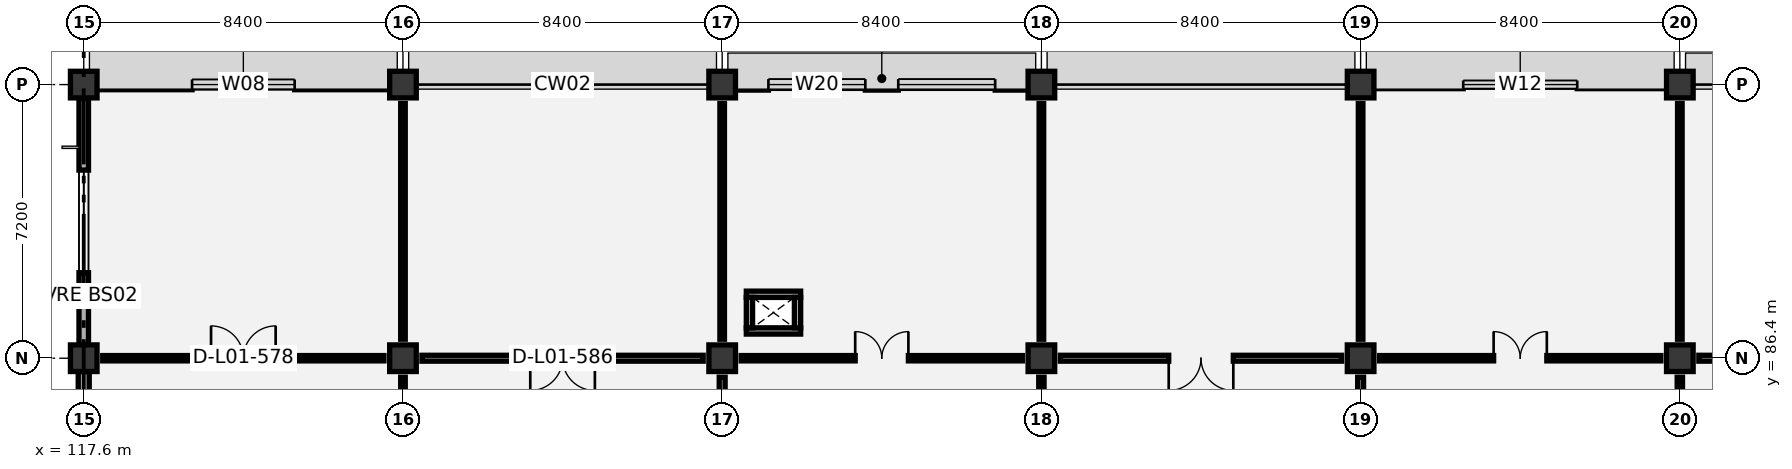
"""IFC4 building model, lengths in metres.
Left out: names, types, materials, properties, quantities, classifications, styles, units other than length and angle.
Written with IfcOpenShell. Run it as: python <this file> out.ifc"""

import sys

from ifc_helpers import new_model, si_unit, direction, frame, frame_2d, origin, origin_2d, place, context, subcontext, project, spatial, rectangle, extrude, element, fill, save


model = new_model("IFC4")
c1 = context("Model", 3, precision=1e-05, world=origin(), true_north=direction((0.0, 1.0)))
c2 = subcontext(c1, "Body", "Model", "MODEL_VIEW")
j1 = project(units=[si_unit("LENGTHUNIT", "METRE"), si_unit("PLANEANGLEUNIT", "RADIAN")], contexts=[c1])
p1 = place(None, origin())
s1 = spatial("IfcSite", under=j1, at=p1, CompositionType="ELEMENT")
p2 = place(p1, origin())
s2 = spatial("IfcBuilding", under=s1, at=p2, CompositionType="ELEMENT")
p3 = place(p2, frame((0.0, 0.0, 6.0)))
s3 = spatial("IfcBuildingStorey", under=s2, at=p3, CompositionType="ELEMENT", Elevation=6.0)
for number, where, z_axis, x_axis in (
    (1, (117.6, 86.4, 0.0), (0.0, 0.0, 1.0), (1.0, 0.0, 0.0)),
    (2, (117.6, 93.6, 0.0), (0.0, 0.0, 1.0), (1.0, 0.0, 0.0)),
    (3, (126.0, 86.4, 0.0), (0.0, 0.0, 1.0), (1.0, 0.0, 0.0)),
    (4, (126.0, 93.6, 0.0), (0.0, 0.0, 1.0), (1.0, 0.0, 0.0)),
    (5, (134.4, 86.4, 0.0), (0.0, 0.0, 1.0), (1.0, 0.0, 0.0)),
    (6, (134.4, 93.6, 0.0), (0.0, 0.0, 1.0), (1.0, 0.0, 0.0)),
    (7, (142.8, 86.4, 0.0), (0.0, 0.0, 1.0), (1.0, 0.0, 0.0)),
    (8, (142.8, 93.6, 0.0), (0.0, 0.0, 1.0), (1.0, 0.0, 0.0)),
    (9, (151.2, 86.4, 0.0), (0.0, 0.0, 1.0), (1.0, 0.0, 0.0)),
    (10, (151.2, 93.6, 0.0), (0.0, 0.0, 1.0), (1.0, 0.0, 0.0)),
    (11, (159.6, 86.4, 0.0), (0.0, 0.0, 1.0), (1.0, 0.0, 0.0)),
    (12, (159.6, 93.6, 0.0), (0.0, 0.0, 1.0), (1.0, 0.0, 0.0)),
):
    element("IfcColumn", number, at=place(p3, frame(where, z_axis=z_axis, x_axis=x_axis)), inside=s3, PredefinedType="COLUMN", context=c2, shape_type="SweptSolid", body=[
        extrude(rectangle(XDim=0.7, YDim=0.7, at=origin_2d()), origin(), (0.0, 0.0, 1.0), 5.4),
    ])
p4 = place(p3, frame((117.6, 79.55, 0.0), z_axis=(0.0, 0.0, 1.0), x_axis=(0.0, 1.0, 0.0)))
e13 = element("IfcWall", 13, at=p4, inside=s3, PredefinedType="SOLIDWALL", context=c2, shape_type="SweptSolid", body=[
    extrude(rectangle(XDim=6.5, YDim=0.29, at=frame_2d((3.25, 0.0))), origin(), (0.0, 0.0, 1.0), 4.42),
])
p5 = place(p4, frame((1.45, 0.0, 0.9)))
e14 = element("IfcOpeningElement", 14, at=p5, cuts=e13, PredefinedType="OPENING", context=c2, shape_type="SweptSolid", body=[
    extrude(rectangle(XDim=3.6, YDim=2.4, at=frame_2d((1.8, 1.2))), frame((0.0, 0.155, 0.0), z_axis=(0.0, -1.0, 0.0), x_axis=(1.0, 0.0, 0.0)), (0.0, 0.0, 1.0), 0.31),
])
p6 = place(p3, frame((117.95, 93.6, 0.0), z_axis=(0.0, 0.0, 1.0), x_axis=(1.0, 0.0, 0.0)))
e15 = element("IfcWall", 15, at=p6, inside=s3, PredefinedType="SOLIDWALL", context=c2, shape_type="SweptSolid", body=[
    extrude(rectangle(XDim=7.7, YDim=0.27, at=frame_2d((3.85, 0.0))), origin(), (0.0, 0.0, 1.0), 4.52),
])
p7 = place(p6, frame((2.5, 0.0, 0.9)))
e16 = element("IfcOpeningElement", 16, at=p7, cuts=e15, PredefinedType="OPENING", context=c2, shape_type="SweptSolid", body=[
    extrude(rectangle(XDim=2.7, YDim=2.1, at=frame_2d((1.35, 1.05))), frame((0.0, 0.145, 0.0), z_axis=(0.0, -1.0, 0.0), x_axis=(1.0, 0.0, 0.0)), (0.0, 0.0, 1.0), 0.29),
])
p8 = place(p3, frame((117.6, 86.75, 0.0), z_axis=(0.0, 0.0, 1.0), x_axis=(0.0, 1.0, 0.0)))
e17 = element("IfcWall", 17, at=p8, inside=s3, PredefinedType="SOLIDWALL", context=c2, shape_type="SweptSolid", body=[
    extrude(rectangle(XDim=6.5, YDim=0.25, at=frame_2d((3.25, 0.0))), origin(), (0.0, 0.0, 1.0), 4.52),
])
p9 = place(p8, frame((1.9, 0.0, 0.9)))
e18 = element("IfcOpeningElement", 18, at=p9, cuts=e17, PredefinedType="OPENING", context=c2, shape_type="SweptSolid", body=[
    extrude(rectangle(XDim=2.7, YDim=2.1, at=frame_2d((1.35, 1.05))), frame((0.0, 0.135, 0.0), z_axis=(0.0, -1.0, 0.0), x_axis=(1.0, 0.0, 0.0)), (0.0, 0.0, 1.0), 0.27),
])
p10 = place(p3, frame((134.75, 93.6, 0.0), z_axis=(0.0, 0.0, 1.0), x_axis=(1.0, 0.0, 0.0)))
e19 = element("IfcWall", 19, at=p10, inside=s3, PredefinedType="SOLIDWALL", context=c2, shape_type="SweptSolid", body=[
    extrude(rectangle(XDim=7.7, YDim=0.29, at=frame_2d((3.85, 0.0))), origin(), (0.0, 0.0, 1.0), 4.52),
])
p11 = place(p10, frame((0.867, 0.0, 0.9)))
e20 = element("IfcOpeningElement", 20, at=p11, cuts=e19, PredefinedType="OPENING", context=c2, shape_type="SweptSolid", body=[
    extrude(rectangle(XDim=2.55, YDim=1.95, at=frame_2d((1.275, 0.975))), frame((0.0, 0.155, 0.0), z_axis=(0.0, -1.0, 0.0), x_axis=(1.0, 0.0, 0.0)), (0.0, 0.0, 1.0), 0.31),
])
p12 = place(p10, frame((4.283, 0.0, 0.9)))
e21 = element("IfcOpeningElement", 21, at=p12, cuts=e19, PredefinedType="OPENING", context=c2, shape_type="SweptSolid", body=[
    extrude(rectangle(XDim=2.55, YDim=1.95, at=frame_2d((1.275, 0.975))), frame((0.0, 0.155, 0.0), z_axis=(0.0, -1.0, 0.0), x_axis=(1.0, 0.0, 0.0)), (0.0, 0.0, 1.0), 0.31),
])
p13 = place(p3, frame((151.55, 93.6, 0.0), z_axis=(0.0, 0.0, 1.0), x_axis=(1.0, 0.0, 0.0)))
e22 = element("IfcWall", 22, at=p13, inside=s3, PredefinedType="SOLIDWALL", context=c2, shape_type="SweptSolid", body=[
    extrude(rectangle(XDim=7.7, YDim=0.215, at=frame_2d((3.85, 0.0))), origin(), (0.0, 0.0, 1.0), 4.52),
])
p14 = place(p13, frame((2.35, 0.0, 0.9)))
e23 = element("IfcOpeningElement", 23, at=p14, cuts=e22, PredefinedType="OPENING", context=c2, shape_type="SweptSolid", body=[
    extrude(rectangle(XDim=3.0, YDim=2.4, at=frame_2d((1.5, 1.2))), frame((0.0, 0.117, 0.0), z_axis=(0.0, -1.0, 0.0), x_axis=(1.0, 0.0, 0.0)), (0.0, 0.0, 1.0), 0.235),
])
p15 = place(p3, frame((117.6, 93.72, 0.0), z_axis=(0.0, 0.0, 1.0), x_axis=(0.0, 1.0, 0.0)))
e24 = element("IfcWall", 24, at=p15, inside=s3, PredefinedType="PARAPET", context=c2, shape_type="SweptSolid", body=[
    extrude(rectangle(XDim=6.96, YDim=0.22, at=frame_2d((3.48, 0.0))), origin(), (0.0, 0.0, 1.0), 1.15),
])
for number, where, z_axis, x_axis in (
    (25, (135.035, 87.117, 0.0), (0.0, 0.0, 1.0), (1.0, 0.0, 0.0)),
    (26, (135.035, 88.083, 0.0), (0.0, 0.0, 1.0), (1.0, 0.0, 0.0)),
):
    element("IfcWall", number, at=place(p3, frame(where, z_axis=z_axis, x_axis=x_axis)), inside=s3, PredefinedType="PARTITIONING", context=c2, shape_type="SweptSolid", body=[
        extrude(rectangle(XDim=1.43, YDim=0.165, at=frame_2d((0.715, 0.0))), origin(), (0.0, 0.0, 1.0), 5.075),
    ])
for number, where, z_axis, x_axis in (
    (27, (135.117, 87.2, 0.0), (0.0, 0.0, 1.0), (0.0, 1.0, 0.0)),
    (28, (136.383, 87.2, 0.0), (0.0, 0.0, 1.0), (0.0, 1.0, 0.0)),
):
    element("IfcWall", number, at=place(p3, frame(where, z_axis=z_axis, x_axis=x_axis)), inside=s3, PredefinedType="PARTITIONING", context=c2, shape_type="SweptSolid", body=[
        extrude(rectangle(XDim=0.8, YDim=0.165, at=frame_2d((0.4, 0.0))), origin(), (0.0, 0.0, 1.0), 5.075),
    ])
p16 = place(p3, frame((126.0, 79.7, 0.0), z_axis=(0.0, 0.0, 1.0), x_axis=(0.0, 1.0, 0.0)))
e29 = element("IfcWall", 29, at=p16, inside=s3, PredefinedType="PARTITIONING", context=c2, shape_type="SweptSolid", body=[
    extrude(rectangle(XDim=6.2, YDim=0.12, at=frame_2d((3.1, 0.0))), origin(), (0.0, 0.0, 1.0), 4.32),
])
p17 = place(p3, frame((118.1, 86.4, 0.0), z_axis=(0.0, 0.0, 1.0), x_axis=(1.0, 0.0, 0.0)))
e30 = element("IfcWall", 30, at=p17, inside=s3, PredefinedType="PARTITIONING", context=c2, shape_type="SweptSolid", body=[
    extrude(rectangle(XDim=7.4, YDim=0.14, at=frame_2d((3.7, 0.0))), origin(), (0.0, 0.0, 1.0), 4.27),
])
p18 = place(p17, frame((2.85, 0.0, 0.0)))
e31 = element("IfcOpeningElement", 31, at=p18, cuts=e30, PredefinedType="OPENING", context=c2, shape_type="SweptSolid", body=[
    extrude(rectangle(XDim=1.7, YDim=2.25, at=frame_2d((0.85, 1.125))), frame((0.0, 0.08, 0.0), z_axis=(0.0, -1.0, 0.0), x_axis=(1.0, 0.0, 0.0)), (0.0, 0.0, 1.0), 0.16),
])
p19 = place(p3, frame((126.0, 86.9, 0.0), z_axis=(0.0, 0.0, 1.0), x_axis=(0.0, 1.0, 0.0)))
e32 = element("IfcWall", 32, at=p19, inside=s3, PredefinedType="PARTITIONING", context=c2, shape_type="SweptSolid", body=[
    extrude(rectangle(XDim=6.2, YDim=0.12, at=frame_2d((3.1, 0.0))), origin(), (0.0, 0.0, 1.0), 4.67),
])
p20 = place(p3, frame((134.4, 79.7, 0.0), z_axis=(0.0, 0.0, 1.0), x_axis=(0.0, 1.0, 0.0)))
e33 = element("IfcWall", 33, at=p20, inside=s3, PredefinedType="PARTITIONING", context=c2, shape_type="SweptSolid", body=[
    extrude(rectangle(XDim=6.2, YDim=0.155, at=frame_2d((3.1, 0.0))), origin(), (0.0, 0.0, 1.0), 4.57),
])
p21 = place(p20, frame((2.4, 0.0, 0.0)))
e34 = element("IfcOpeningElement", 34, at=p21, cuts=e33, PredefinedType="OPENING", context=c2, shape_type="SweptSolid", body=[
    extrude(rectangle(XDim=1.4, YDim=2.15, at=frame_2d((0.7, 1.075))), frame((0.0, 0.087, 0.0), z_axis=(0.0, -1.0, 0.0), x_axis=(1.0, 0.0, 0.0)), (0.0, 0.0, 1.0), 0.175),
])
p22 = place(p3, frame((126.5, 86.4, 0.0), z_axis=(0.0, 0.0, 1.0), x_axis=(1.0, 0.0, 0.0)))
e35 = element("IfcWall", 35, at=p22, inside=s3, PredefinedType="PARTITIONING", context=c2, shape_type="SweptSolid", body=[
    extrude(rectangle(XDim=7.4, YDim=0.155, at=frame_2d((3.7, 0.0))), origin(), (0.0, 0.0, 1.0), 4.27),
])
p23 = place(p22, frame((2.85, 0.0, 0.0)))
e36 = element("IfcOpeningElement", 36, at=p23, cuts=e35, PredefinedType="OPENING", context=c2, shape_type="SweptSolid", body=[
    extrude(rectangle(XDim=1.7, YDim=2.25, at=frame_2d((0.85, 1.125))), frame((0.0, 0.087, 0.0), z_axis=(0.0, -1.0, 0.0), x_axis=(1.0, 0.0, 0.0)), (0.0, 0.0, 1.0), 0.175),
])
p24 = place(p3, frame((134.4, 86.9, 0.0), z_axis=(0.0, 0.0, 1.0), x_axis=(0.0, 1.0, 0.0)))
e37 = element("IfcWall", 37, at=p24, inside=s3, PredefinedType="PARTITIONING", context=c2, shape_type="SweptSolid", body=[
    extrude(rectangle(XDim=6.2, YDim=0.12, at=frame_2d((3.1, 0.0))), origin(), (0.0, 0.0, 1.0), 4.42),
])
p25 = place(p3, frame((142.8, 79.7, 0.0), z_axis=(0.0, 0.0, 1.0), x_axis=(0.0, 1.0, 0.0)))
e38 = element("IfcWall", 38, at=p25, inside=s3, PredefinedType="PARTITIONING", context=c2, shape_type="SweptSolid", body=[
    extrude(rectangle(XDim=6.2, YDim=0.14, at=frame_2d((3.1, 0.0))), origin(), (0.0, 0.0, 1.0), 4.32),
])
p26 = place(p25, frame((2.25, 0.0, 0.0)))
e39 = element("IfcOpeningElement", 39, at=p26, cuts=e38, PredefinedType="OPENING", context=c2, shape_type="SweptSolid", body=[
    extrude(rectangle(XDim=1.7, YDim=2.25, at=frame_2d((0.85, 1.125))), frame((0.0, 0.08, 0.0), z_axis=(0.0, -1.0, 0.0), x_axis=(1.0, 0.0, 0.0)), (0.0, 0.0, 1.0), 0.16),
])
p27 = place(p3, frame((134.9, 86.4, 0.0), z_axis=(0.0, 0.0, 1.0), x_axis=(1.0, 0.0, 0.0)))
e40 = element("IfcWall", 40, at=p27, inside=s3, PredefinedType="PARTITIONING", context=c2, shape_type="SweptSolid", body=[
    extrude(rectangle(XDim=7.4, YDim=0.14, at=frame_2d((3.7, 0.0))), origin(), (0.0, 0.0, 1.0), 4.27),
])
p28 = place(p27, frame((3.0, 0.0, 0.0)))
e41 = element("IfcOpeningElement", 41, at=p28, cuts=e40, PredefinedType="OPENING", context=c2, shape_type="SweptSolid", body=[
    extrude(rectangle(XDim=1.4, YDim=2.15, at=frame_2d((0.7, 1.075))), frame((0.0, 0.08, 0.0), z_axis=(0.0, -1.0, 0.0), x_axis=(1.0, 0.0, 0.0)), (0.0, 0.0, 1.0), 0.16),
])
p29 = place(p3, frame((142.8, 86.9, 0.0), z_axis=(0.0, 0.0, 1.0), x_axis=(0.0, 1.0, 0.0)))
e42 = element("IfcWall", 42, at=p29, inside=s3, PredefinedType="PARTITIONING", context=c2, shape_type="SweptSolid", body=[
    extrude(rectangle(XDim=6.2, YDim=0.12, at=frame_2d((3.1, 0.0))), origin(), (0.0, 0.0, 1.0), 4.77),
])
p30 = place(p3, frame((151.2, 79.7, 0.0), z_axis=(0.0, 0.0, 1.0), x_axis=(0.0, 1.0, 0.0)))
e43 = element("IfcWall", 43, at=p30, inside=s3, PredefinedType="PARTITIONING", context=c2, shape_type="SweptSolid", body=[
    extrude(rectangle(XDim=6.2, YDim=0.155, at=frame_2d((3.1, 0.0))), origin(), (0.0, 0.0, 1.0), 4.67),
])
p31 = place(p30, frame((2.4, 0.0, 0.0)))
e44 = element("IfcOpeningElement", 44, at=p31, cuts=e43, PredefinedType="OPENING", context=c2, shape_type="SweptSolid", body=[
    extrude(rectangle(XDim=1.4, YDim=2.15, at=frame_2d((0.7, 1.075))), frame((0.0, 0.087, 0.0), z_axis=(0.0, -1.0, 0.0), x_axis=(1.0, 0.0, 0.0)), (0.0, 0.0, 1.0), 0.175),
])
p32 = place(p3, frame((143.3, 86.4, 0.0), z_axis=(0.0, 0.0, 1.0), x_axis=(1.0, 0.0, 0.0)))
e45 = element("IfcWall", 45, at=p32, inside=s3, PredefinedType="PARTITIONING", context=c2, shape_type="SweptSolid", body=[
    extrude(rectangle(XDim=7.4, YDim=0.155, at=frame_2d((3.7, 0.0))), origin(), (0.0, 0.0, 1.0), 4.27),
])
p33 = place(p32, frame((2.85, 0.0, 0.0)))
e46 = element("IfcOpeningElement", 46, at=p33, cuts=e45, PredefinedType="OPENING", context=c2, shape_type="SweptSolid", body=[
    extrude(rectangle(XDim=1.7, YDim=2.25, at=frame_2d((0.85, 1.125))), frame((0.0, 0.087, 0.0), z_axis=(0.0, -1.0, 0.0), x_axis=(1.0, 0.0, 0.0)), (0.0, 0.0, 1.0), 0.175),
])
p34 = place(p3, frame((151.2, 86.9, 0.0), z_axis=(0.0, 0.0, 1.0), x_axis=(0.0, 1.0, 0.0)))
e47 = element("IfcWall", 47, at=p34, inside=s3, PredefinedType="PARTITIONING", context=c2, shape_type="SweptSolid", body=[
    extrude(rectangle(XDim=6.2, YDim=0.12, at=frame_2d((3.1, 0.0))), origin(), (0.0, 0.0, 1.0), 4.42),
])
p35 = place(p3, frame((159.6, 79.7, 0.0), z_axis=(0.0, 0.0, 1.0), x_axis=(0.0, 1.0, 0.0)))
e48 = element("IfcWall", 48, at=p35, inside=s3, PredefinedType="PARTITIONING", context=c2, shape_type="SweptSolid", body=[
    extrude(rectangle(XDim=6.2, YDim=0.14, at=frame_2d((3.1, 0.0))), origin(), (0.0, 0.0, 1.0), 4.32),
])
p36 = place(p35, frame((2.25, 0.0, 0.0)))
e49 = element("IfcOpeningElement", 49, at=p36, cuts=e48, PredefinedType="OPENING", context=c2, shape_type="SweptSolid", body=[
    extrude(rectangle(XDim=1.7, YDim=2.25, at=frame_2d((0.85, 1.125))), frame((0.0, 0.08, 0.0), z_axis=(0.0, -1.0, 0.0), x_axis=(1.0, 0.0, 0.0)), (0.0, 0.0, 1.0), 0.16),
])
p37 = place(p3, frame((151.7, 86.4, 0.0), z_axis=(0.0, 0.0, 1.0), x_axis=(1.0, 0.0, 0.0)))
e50 = element("IfcWall", 50, at=p37, inside=s3, PredefinedType="PARTITIONING", context=c2, shape_type="SweptSolid", body=[
    extrude(rectangle(XDim=7.4, YDim=0.14, at=frame_2d((3.7, 0.0))), origin(), (0.0, 0.0, 1.0), 4.27),
])
p38 = place(p37, frame((3.0, 0.0, 0.0)))
e51 = element("IfcOpeningElement", 51, at=p38, cuts=e50, PredefinedType="OPENING", context=c2, shape_type="SweptSolid", body=[
    extrude(rectangle(XDim=1.4, YDim=2.15, at=frame_2d((0.7, 1.075))), frame((0.0, 0.08, 0.0), z_axis=(0.0, -1.0, 0.0), x_axis=(1.0, 0.0, 0.0)), (0.0, 0.0, 1.0), 0.16),
])
p39 = place(p3, frame((159.6, 86.9, 0.0), z_axis=(0.0, 0.0, 1.0), x_axis=(0.0, 1.0, 0.0)))
e52 = element("IfcWall", 52, at=p39, inside=s3, PredefinedType="PARTITIONING", context=c2, shape_type="SweptSolid", body=[
    extrude(rectangle(XDim=6.2, YDim=0.12, at=frame_2d((3.1, 0.0))), origin(), (0.0, 0.0, 1.0), 4.88),
])
p40 = place(p3, frame((160.1, 86.4, 0.0), z_axis=(0.0, 0.0, 1.0), x_axis=(1.0, 0.0, 0.0)))
e53 = element("IfcWall", 53, at=p40, inside=s3, PredefinedType="PARTITIONING", context=c2, shape_type="SweptSolid", body=[
    extrude(rectangle(XDim=7.4, YDim=0.155, at=frame_2d((3.7, 0.0))), origin(), (0.0, 0.0, 1.0), 4.37),
])
p41 = place(p40, frame((3.0, 0.0, 0.0)))
e54 = element("IfcOpeningElement", 54, at=p41, cuts=e53, PredefinedType="OPENING", context=c2, shape_type="SweptSolid", body=[
    extrude(rectangle(XDim=1.4, YDim=2.15, at=frame_2d((0.7, 1.075))), frame((0.0, 0.087, 0.0), z_axis=(0.0, -1.0, 0.0), x_axis=(1.0, 0.0, 0.0)), (0.0, 0.0, 1.0), 0.175),
])
p42 = place(p7, origin())
e55 = element("IfcWindow", 55, at=p42, inside=s3, PartitioningType="SINGLE_PANEL", PredefinedType="WINDOW", context=c2, shape_type="SweptSolid", body=[
    extrude(rectangle(XDim=2.7, YDim=2.1, at=frame_2d((1.35, 1.05))), frame((0.0, 0.03, 0.0), z_axis=(0.0, -1.0, 0.0), x_axis=(1.0, 0.0, 0.0)), (0.0, 0.0, 1.0), 0.06),
])
fill(e16, e55)
p43 = place(p9, origin())
e56 = element("IfcWindow", 56, at=p43, inside=s3, PartitioningType="SINGLE_PANEL", PredefinedType="WINDOW", context=c2, shape_type="SweptSolid", body=[
    extrude(rectangle(XDim=2.7, YDim=2.1, at=frame_2d((1.35, 1.05))), frame((0.0, 0.03, 0.0), z_axis=(0.0, -1.0, 0.0), x_axis=(1.0, 0.0, 0.0)), (0.0, 0.0, 1.0), 0.06),
])
fill(e18, e56)
p44 = place(p11, origin())
e57 = element("IfcWindow", 57, at=p44, inside=s3, PartitioningType="SINGLE_PANEL", PredefinedType="WINDOW", context=c2, shape_type="SweptSolid", body=[
    extrude(rectangle(XDim=2.55, YDim=1.95, at=frame_2d((1.275, 0.975))), frame((0.0, 0.03, 0.0), z_axis=(0.0, -1.0, 0.0), x_axis=(1.0, 0.0, 0.0)), (0.0, 0.0, 1.0), 0.06),
])
fill(e20, e57)
p45 = place(p12, origin())
e58 = element("IfcWindow", 58, at=p45, inside=s3, PartitioningType="SINGLE_PANEL", PredefinedType="WINDOW", context=c2, shape_type="SweptSolid", body=[
    extrude(rectangle(XDim=2.55, YDim=1.95, at=frame_2d((1.275, 0.975))), frame((0.0, 0.03, 0.0), z_axis=(0.0, -1.0, 0.0), x_axis=(1.0, 0.0, 0.0)), (0.0, 0.0, 1.0), 0.06),
])
fill(e21, e58)
p46 = place(p14, origin())
e59 = element("IfcWindow", 59, at=p46, inside=s3, PartitioningType="SINGLE_PANEL", PredefinedType="WINDOW", context=c2, shape_type="SweptSolid", body=[
    extrude(rectangle(XDim=3.0, YDim=2.4, at=frame_2d((1.5, 1.2))), frame((0.0, 0.03, 0.0), z_axis=(0.0, -1.0, 0.0), x_axis=(1.0, 0.0, 0.0)), (0.0, 0.0, 1.0), 0.06),
])
fill(e23, e59)
p47 = place(p18, origin())
e60 = element("IfcDoor", 60, at=p47, inside=s3, OperationType="DOUBLE_DOOR_SINGLE_SWING", PredefinedType="DOOR", context=c2, shape_type="SweptSolid", body=[
    extrude(rectangle(XDim=1.7, YDim=2.25, at=frame_2d((0.85, 1.125))), frame((0.0, 0.025, 0.0), z_axis=(0.0, -1.0, 0.0), x_axis=(1.0, 0.0, 0.0)), (0.0, 0.0, 1.0), 0.05),
])
fill(e31, e60)
p48 = place(p23, frame((1.7, 0.0, 0.0), z_axis=(0.0, 0.0, 1.0), x_axis=(-1.0, 0.0, 0.0)))
e61 = element("IfcDoor", 61, at=p48, inside=s3, OperationType="DOUBLE_DOOR_SINGLE_SWING", PredefinedType="DOOR", context=c2, shape_type="SweptSolid", body=[
    extrude(rectangle(XDim=1.7, YDim=2.25, at=frame_2d((0.85, 1.125))), frame((0.0, 0.025, 0.0), z_axis=(0.0, -1.0, 0.0), x_axis=(1.0, 0.0, 0.0)), (0.0, 0.0, 1.0), 0.05),
])
fill(e36, e61)
p49 = place(p28, origin())
e62 = element("IfcDoor", 62, at=p49, inside=s3, OperationType="DOUBLE_DOOR_SINGLE_SWING", PredefinedType="DOOR", context=c2, shape_type="SweptSolid", body=[
    extrude(rectangle(XDim=1.4, YDim=2.15, at=frame_2d((0.7, 1.075))), frame((0.0, 0.025, 0.0), z_axis=(0.0, -1.0, 0.0), x_axis=(1.0, 0.0, 0.0)), (0.0, 0.0, 1.0), 0.05),
])
fill(e41, e62)
p50 = place(p33, frame((1.7, 0.0, 0.0), z_axis=(0.0, 0.0, 1.0), x_axis=(-1.0, 0.0, 0.0)))
e63 = element("IfcDoor", 63, at=p50, inside=s3, OperationType="DOUBLE_DOOR_SINGLE_SWING", PredefinedType="DOOR", context=c2, shape_type="SweptSolid", body=[
    extrude(rectangle(XDim=1.7, YDim=2.25, at=frame_2d((0.85, 1.125))), frame((0.0, 0.025, 0.0), z_axis=(0.0, -1.0, 0.0), x_axis=(1.0, 0.0, 0.0)), (0.0, 0.0, 1.0), 0.05),
])
fill(e46, e63)
p51 = place(p38, origin())
e64 = element("IfcDoor", 64, at=p51, inside=s3, OperationType="DOUBLE_DOOR_SINGLE_SWING", PredefinedType="DOOR", context=c2, shape_type="SweptSolid", body=[
    extrude(rectangle(XDim=1.4, YDim=2.15, at=frame_2d((0.7, 1.075))), frame((0.0, 0.025, 0.0), z_axis=(0.0, -1.0, 0.0), x_axis=(1.0, 0.0, 0.0)), (0.0, 0.0, 1.0), 0.05),
])
fill(e51, e64)
save(model, sys.argv[1])
